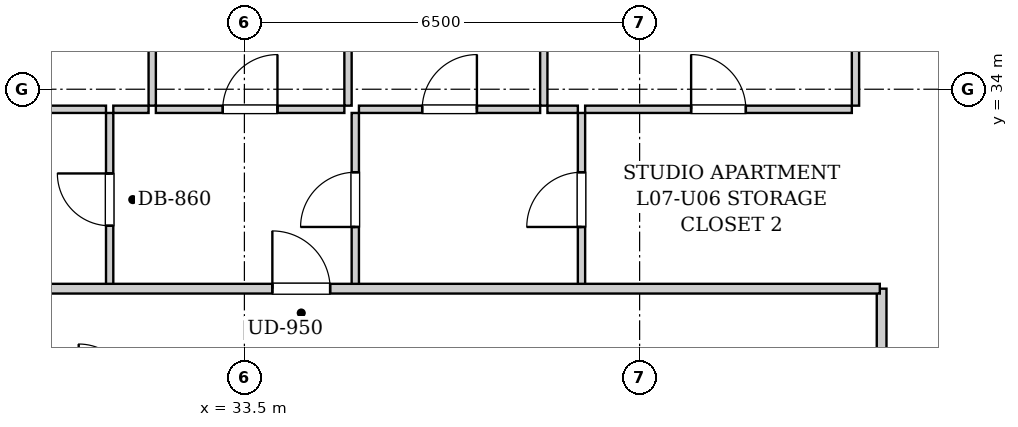
"""IFC4 building model, lengths in metres.
Left out: names, types, materials, properties, quantities, classifications, styles, units other than length and angle.
Written with IfcOpenShell. Run it as: python <this file> out.ifc"""

import sys

from ifc_helpers import new_model, si_unit, direction, frame, frame_2d, origin, place, context, subcontext, project, spatial, rectangle, extrude, element, fill, save


model = new_model("IFC4")
c1 = context("Model", 3, precision=1e-05, world=origin(), true_north=direction((0.0, 1.0)))
c2 = subcontext(c1, "Body", "Model", "MODEL_VIEW")
j1 = project(units=[si_unit("LENGTHUNIT", "METRE"), si_unit("PLANEANGLEUNIT", "RADIAN")], contexts=[c1])
p1 = place(None, origin())
s1 = spatial("IfcSite", under=j1, at=p1, CompositionType="ELEMENT")
p2 = place(p1, origin())
s2 = spatial("IfcBuilding", under=s1, at=p2, CompositionType="ELEMENT")
p3 = place(p2, frame((0.0, 0.0, 32.2)))
s3 = spatial("IfcBuildingStorey", under=s2, at=p3, CompositionType="ELEMENT", Elevation=32.2)
p4 = place(p3, frame((43.98, 28.98, 0.0), z_axis=(0.0, 0.0, 1.0), x_axis=(0.0, 1.0, 0.0)))
e1 = element("IfcWall", 1, at=p4, inside=s3, PredefinedType="PARTITIONING", context=c2, shape_type="SweptSolid", body=[
    extrude(rectangle(XDim=1.74, YDim=0.16, at=frame_2d((0.87, 0.0))), origin(), (0.0, 0.0, 1.0), 2.94),
])
p5 = place(p3, frame((31.284, 30.76, 0.0), z_axis=(0.0, 0.0, 1.0), x_axis=(0.0, 1.0, 0.0)))
e2 = element("IfcWall", 2, at=p5, inside=s3, PredefinedType="PARTITIONING", context=c2, shape_type="SweptSolid", body=[
    extrude(rectangle(XDim=2.85, YDim=0.12, at=frame_2d((1.425, 0.0))), origin(), (0.0, 0.0, 1.0), 2.94),
])
p6 = place(p5, frame((0.995, 0.0, 0.0)))
e3 = element("IfcOpeningElement", 3, at=p6, cuts=e2, PredefinedType="OPENING", context=c2, shape_type="SweptSolid", body=[
    extrude(rectangle(XDim=0.86, YDim=2.05, at=frame_2d((0.43, 1.025))), frame((0.0, 0.07, 0.0), z_axis=(0.0, -1.0, 0.0), x_axis=(1.0, 0.0, 0.0)), (0.0, 0.0, 1.0), 0.14),
])
p7 = place(p3, frame((28.824, 33.67, 0.0), z_axis=(0.0, 0.0, 1.0), x_axis=(1.0, 0.0, 0.0)))
e4 = element("IfcWall", 4, at=p7, inside=s3, PredefinedType="PARTITIONING", context=c2, shape_type="SweptSolid", body=[
    extrude(rectangle(XDim=2.4, YDim=0.12, at=frame_2d((1.2, 0.0))), origin(), (0.0, 0.0, 1.0), 2.94),
])
p8 = place(p3, frame((35.324, 30.76, 0.0), z_axis=(0.0, 0.0, 1.0), x_axis=(0.0, 1.0, 0.0)))
e5 = element("IfcWall", 5, at=p8, inside=s3, PredefinedType="PARTITIONING", context=c2, shape_type="SweptSolid", body=[
    extrude(rectangle(XDim=2.85, YDim=0.12, at=frame_2d((1.425, 0.0))), origin(), (0.0, 0.0, 1.0), 2.94),
])
p9 = place(p8, frame((0.975, 0.0, 0.0)))
e6 = element("IfcOpeningElement", 6, at=p9, cuts=e5, PredefinedType="OPENING", context=c2, shape_type="SweptSolid", body=[
    extrude(rectangle(XDim=0.9, YDim=2.05, at=frame_2d((0.45, 1.025))), frame((0.0, 0.07, 0.0), z_axis=(0.0, -1.0, 0.0), x_axis=(1.0, 0.0, 0.0)), (0.0, 0.0, 1.0), 0.14),
])
p10 = place(p3, frame((31.344, 33.67, 0.0), z_axis=(0.0, 0.0, 1.0), x_axis=(1.0, 0.0, 0.0)))
e7 = element("IfcWall", 7, at=p10, inside=s3, PredefinedType="PARTITIONING", context=c2, shape_type="SweptSolid", body=[
    extrude(rectangle(XDim=0.58, YDim=0.12, at=frame_2d((0.29, 0.0))), origin(), (0.0, 0.0, 1.0), 2.94),
])
p11 = place(p3, frame((32.044, 33.67, 0.0), z_axis=(0.0, 0.0, 1.0), x_axis=(1.0, 0.0, 0.0)))
e8 = element("IfcWall", 8, at=p11, inside=s3, PredefinedType="PARTITIONING", context=c2, shape_type="SweptSolid", body=[
    extrude(rectangle(XDim=3.1, YDim=0.12, at=frame_2d((1.55, 0.0))), origin(), (0.0, 0.0, 1.0), 2.94),
])
p12 = place(p11, frame((1.1, 0.0, 0.0)))
e9 = element("IfcOpeningElement", 9, at=p12, cuts=e8, PredefinedType="OPENING", context=c2, shape_type="SweptSolid", body=[
    extrude(rectangle(XDim=0.9, YDim=2.05, at=frame_2d((0.45, 1.025))), frame((0.0, 0.07, 0.0), z_axis=(0.0, -1.0, 0.0), x_axis=(1.0, 0.0, 0.0)), (0.0, 0.0, 1.0), 0.14),
])
p13 = place(p3, frame((39.044, 30.76, 0.0), z_axis=(0.0, 0.0, 1.0), x_axis=(0.0, 1.0, 0.0)))
e10 = element("IfcWall", 10, at=p13, inside=s3, PredefinedType="PARTITIONING", context=c2, shape_type="SweptSolid", body=[
    extrude(rectangle(XDim=2.85, YDim=0.12, at=frame_2d((1.425, 0.0))), origin(), (0.0, 0.0, 1.0), 2.94),
])
p14 = place(p13, frame((0.975, 0.0, 0.0)))
e11 = element("IfcOpeningElement", 11, at=p14, cuts=e10, PredefinedType="OPENING", context=c2, shape_type="SweptSolid", body=[
    extrude(rectangle(XDim=0.9, YDim=2.05, at=frame_2d((0.45, 1.025))), frame((0.0, 0.07, 0.0), z_axis=(0.0, -1.0, 0.0), x_axis=(1.0, 0.0, 0.0)), (0.0, 0.0, 1.0), 0.14),
])
p15 = place(p3, frame((35.384, 33.67, 0.0), z_axis=(0.0, 0.0, 1.0), x_axis=(1.0, 0.0, 0.0)))
e12 = element("IfcWall", 12, at=p15, inside=s3, PredefinedType="PARTITIONING", context=c2, shape_type="SweptSolid", body=[
    extrude(rectangle(XDim=2.98, YDim=0.12, at=frame_2d((1.49, 0.0))), origin(), (0.0, 0.0, 1.0), 2.94),
])
p16 = place(p15, frame((1.04, 0.0, 0.0)))
e13 = element("IfcOpeningElement", 13, at=p16, cuts=e12, PredefinedType="OPENING", context=c2, shape_type="SweptSolid", body=[
    extrude(rectangle(XDim=0.9, YDim=2.05, at=frame_2d((0.45, 1.025))), frame((0.0, 0.07, 0.0), z_axis=(0.0, -1.0, 0.0), x_axis=(1.0, 0.0, 0.0)), (0.0, 0.0, 1.0), 0.14),
])
p17 = place(p3, frame((38.484, 33.67, 0.0), z_axis=(0.0, 0.0, 1.0), x_axis=(1.0, 0.0, 0.0)))
e14 = element("IfcWall", 14, at=p17, inside=s3, PredefinedType="PARTITIONING", context=c2, shape_type="SweptSolid", body=[
    extrude(rectangle(XDim=0.5, YDim=0.12, at=frame_2d((0.25, 0.0))), origin(), (0.0, 0.0, 1.0), 2.94),
])
p18 = place(p3, frame((39.104, 33.67, 0.0), z_axis=(0.0, 0.0, 1.0), x_axis=(1.0, 0.0, 0.0)))
e15 = element("IfcWall", 15, at=p18, inside=s3, PredefinedType="PARTITIONING", context=c2, shape_type="SweptSolid", body=[
    extrude(rectangle(XDim=4.386, YDim=0.12, at=frame_2d((2.193, 0.0))), origin(), (0.0, 0.0, 1.0), 2.94),
])
p19 = place(p18, frame((1.743, 0.0, 0.0)))
e16 = element("IfcOpeningElement", 16, at=p19, cuts=e15, PredefinedType="OPENING", context=c2, shape_type="SweptSolid", body=[
    extrude(rectangle(XDim=0.9, YDim=2.05, at=frame_2d((0.45, 1.025))), frame((0.0, 0.07, 0.0), z_axis=(0.0, -1.0, 0.0), x_axis=(1.0, 0.0, 0.0)), (0.0, 0.0, 1.0), 0.14),
])
p20 = place(p3, frame((31.984, 33.73, 0.0), z_axis=(0.0, 0.0, 1.0), x_axis=(0.0, 1.0, 0.0)))
e17 = element("IfcWall", 17, at=p20, inside=s3, PredefinedType="PARTITIONING", context=c2, shape_type="SweptSolid", body=[
    extrude(rectangle(XDim=13.59, YDim=0.12, at=frame_2d((6.795, 0.0))), origin(), (0.0, 0.0, 1.0), 2.94),
])
p21 = place(p20, frame((6.33, 0.0, 0.0)))
e18 = element("IfcOpeningElement", 18, at=p21, cuts=e17, PredefinedType="OPENING", context=c2, shape_type="SweptSolid", body=[
    extrude(rectangle(XDim=0.9, YDim=2.05, at=frame_2d((0.45, 1.025))), frame((0.0, 0.07, 0.0), z_axis=(0.0, -1.0, 0.0), x_axis=(1.0, 0.0, 0.0)), (0.0, 0.0, 1.0), 0.14),
])
p22 = place(p3, frame((35.204, 33.73, 0.0), z_axis=(0.0, 0.0, 1.0), x_axis=(0.0, 1.0, 0.0)))
e19 = element("IfcWall", 19, at=p22, inside=s3, PredefinedType="PARTITIONING", context=c2, shape_type="SweptSolid", body=[
    extrude(rectangle(XDim=13.59, YDim=0.12, at=frame_2d((6.795, 0.0))), origin(), (0.0, 0.0, 1.0), 2.94),
])
p23 = place(p22, frame((6.33, 0.0, 0.0)))
e20 = element("IfcOpeningElement", 20, at=p23, cuts=e19, PredefinedType="OPENING", context=c2, shape_type="SweptSolid", body=[
    extrude(rectangle(XDim=0.9, YDim=2.05, at=frame_2d((0.45, 1.025))), frame((0.0, 0.07, 0.0), z_axis=(0.0, -1.0, 0.0), x_axis=(1.0, 0.0, 0.0)), (0.0, 0.0, 1.0), 0.14),
])
p24 = place(p3, frame((38.424, 33.73, 0.0), z_axis=(0.0, 0.0, 1.0), x_axis=(0.0, 1.0, 0.0)))
e21 = element("IfcWall", 21, at=p24, inside=s3, PredefinedType="PARTITIONING", context=c2, shape_type="SweptSolid", body=[
    extrude(rectangle(XDim=11.44, YDim=0.12, at=frame_2d((5.72, 0.0))), origin(), (0.0, 0.0, 1.0), 2.94),
])
p25 = place(p24, frame((5.27, 0.0, 0.0)))
e22 = element("IfcOpeningElement", 22, at=p25, cuts=e21, PredefinedType="OPENING", context=c2, shape_type="SweptSolid", body=[
    extrude(rectangle(XDim=0.9, YDim=2.05, at=frame_2d((0.45, 1.025))), frame((0.0, 0.07, 0.0), z_axis=(0.0, -1.0, 0.0), x_axis=(1.0, 0.0, 0.0)), (0.0, 0.0, 1.0), 0.14),
])
p26 = place(p3, frame((43.55, 33.73, 0.0), z_axis=(0.0, 0.0, 1.0), x_axis=(0.0, 1.0, 0.0)))
e23 = element("IfcWall", 23, at=p26, inside=s3, PredefinedType="PARTITIONING", context=c2, shape_type="SweptSolid", body=[
    extrude(rectangle(XDim=13.59, YDim=0.12, at=frame_2d((6.795, 0.0))), origin(), (0.0, 0.0, 1.0), 2.94),
])
p27 = place(p26, frame((6.33, 0.0, 0.0)))
e24 = element("IfcOpeningElement", 24, at=p27, cuts=e23, PredefinedType="OPENING", context=c2, shape_type="SweptSolid", body=[
    extrude(rectangle(XDim=0.9, YDim=2.05, at=frame_2d((0.45, 1.025))), frame((0.0, 0.07, 0.0), z_axis=(0.0, -1.0, 0.0), x_axis=(1.0, 0.0, 0.0)), (0.0, 0.0, 1.0), 0.14),
])
p28 = place(p3, frame((10.05, 30.72, 0.0), z_axis=(0.0, 0.0, 1.0), x_axis=(1.0, 0.0, 0.0)))
e25 = element("IfcWall", 25, at=p28, inside=s3, PredefinedType="PARTITIONING", context=c2, shape_type="SweptSolid", body=[
    extrude(rectangle(XDim=33.9, YDim=0.16, at=frame_2d((16.95, 0.0))), origin(), (0.0, 0.0, 1.0), 2.94),
])
p29 = place(p28, frame((4.165, 0.0, 0.0)))
e26 = element("IfcOpeningElement", 26, at=p29, cuts=e25, PredefinedType="OPENING", context=c2, shape_type="SweptSolid", body=[
    extrude(rectangle(XDim=0.95, YDim=2.1, at=frame_2d((0.475, 1.05))), frame((0.0, 0.09, 0.0), z_axis=(0.0, -1.0, 0.0), x_axis=(1.0, 0.0, 0.0)), (0.0, 0.0, 1.0), 0.18),
])
p30 = place(p28, frame((15.813, 0.0, 0.0)))
e27 = element("IfcOpeningElement", 27, at=p30, cuts=e25, PredefinedType="OPENING", context=c2, shape_type="SweptSolid", body=[
    extrude(rectangle(XDim=0.95, YDim=2.1, at=frame_2d((0.475, 1.05))), frame((0.0, 0.09, 0.0), z_axis=(0.0, -1.0, 0.0), x_axis=(1.0, 0.0, 0.0)), (0.0, 0.0, 1.0), 0.18),
])
p31 = place(p28, frame((23.91, 0.0, 0.0)))
e28 = element("IfcOpeningElement", 28, at=p31, cuts=e25, PredefinedType="OPENING", context=c2, shape_type="SweptSolid", body=[
    extrude(rectangle(XDim=0.95, YDim=2.1, at=frame_2d((0.475, 1.05))), frame((0.0, 0.09, 0.0), z_axis=(0.0, -1.0, 0.0), x_axis=(1.0, 0.0, 0.0)), (0.0, 0.0, 1.0), 0.18),
])
p32 = place(p6, origin())
e29 = element("IfcDoor", 29, at=p32, inside=s3, OperationType="SINGLE_SWING_RIGHT", PredefinedType="DOOR", context=c2, shape_type="SweptSolid", body=[
    extrude(rectangle(XDim=0.86, YDim=2.05, at=frame_2d((0.43, 1.025))), frame((0.0, 0.025, 0.0), z_axis=(0.0, -1.0, 0.0), x_axis=(1.0, 0.0, 0.0)), (0.0, 0.0, 1.0), 0.05),
])
fill(e3, e29)
p33 = place(p9, origin())
e30 = element("IfcDoor", 30, at=p33, inside=s3, OperationType="SINGLE_SWING_LEFT", PredefinedType="DOOR", context=c2, shape_type="SweptSolid", body=[
    extrude(rectangle(XDim=0.9, YDim=2.05, at=frame_2d((0.45, 1.025))), frame((0.0, 0.025, 0.0), z_axis=(0.0, -1.0, 0.0), x_axis=(1.0, 0.0, 0.0)), (0.0, 0.0, 1.0), 0.05),
])
fill(e6, e30)
p34 = place(p12, origin())
e31 = element("IfcDoor", 31, at=p34, inside=s3, OperationType="SINGLE_SWING_RIGHT", PredefinedType="DOOR", context=c2, shape_type="SweptSolid", body=[
    extrude(rectangle(XDim=0.9, YDim=2.05, at=frame_2d((0.45, 1.025))), frame((0.0, 0.025, 0.0), z_axis=(0.0, -1.0, 0.0), x_axis=(1.0, 0.0, 0.0)), (0.0, 0.0, 1.0), 0.05),
])
fill(e9, e31)
p35 = place(p14, origin())
e32 = element("IfcDoor", 32, at=p35, inside=s3, OperationType="SINGLE_SWING_LEFT", PredefinedType="DOOR", context=c2, shape_type="SweptSolid", body=[
    extrude(rectangle(XDim=0.9, YDim=2.05, at=frame_2d((0.45, 1.025))), frame((0.0, 0.025, 0.0), z_axis=(0.0, -1.0, 0.0), x_axis=(1.0, 0.0, 0.0)), (0.0, 0.0, 1.0), 0.05),
])
fill(e11, e32)
p36 = place(p16, origin())
e33 = element("IfcDoor", 33, at=p36, inside=s3, OperationType="SINGLE_SWING_RIGHT", PredefinedType="DOOR", context=c2, shape_type="SweptSolid", body=[
    extrude(rectangle(XDim=0.9, YDim=2.05, at=frame_2d((0.45, 1.025))), frame((0.0, 0.025, 0.0), z_axis=(0.0, -1.0, 0.0), x_axis=(1.0, 0.0, 0.0)), (0.0, 0.0, 1.0), 0.05),
])
fill(e13, e33)
p37 = place(p19, origin())
e34 = element("IfcDoor", 34, at=p37, inside=s3, OperationType="SINGLE_SWING_LEFT", PredefinedType="DOOR", context=c2, shape_type="SweptSolid", body=[
    extrude(rectangle(XDim=0.9, YDim=2.05, at=frame_2d((0.45, 1.025))), frame((0.0, 0.025, 0.0), z_axis=(0.0, -1.0, 0.0), x_axis=(1.0, 0.0, 0.0)), (0.0, 0.0, 1.0), 0.05),
])
fill(e16, e34)
p38 = place(p31, origin())
e35 = element("IfcDoor", 35, at=p38, inside=s3, OperationType="SINGLE_SWING_LEFT", PredefinedType="DOOR", context=c2, shape_type="SweptSolid", body=[
    extrude(rectangle(XDim=0.95, YDim=2.1, at=frame_2d((0.475, 1.05))), frame((0.0, 0.025, 0.0), z_axis=(0.0, -1.0, 0.0), x_axis=(1.0, 0.0, 0.0)), (0.0, 0.0, 1.0), 0.05),
])
fill(e28, e35)
save(model, sys.argv[1])
